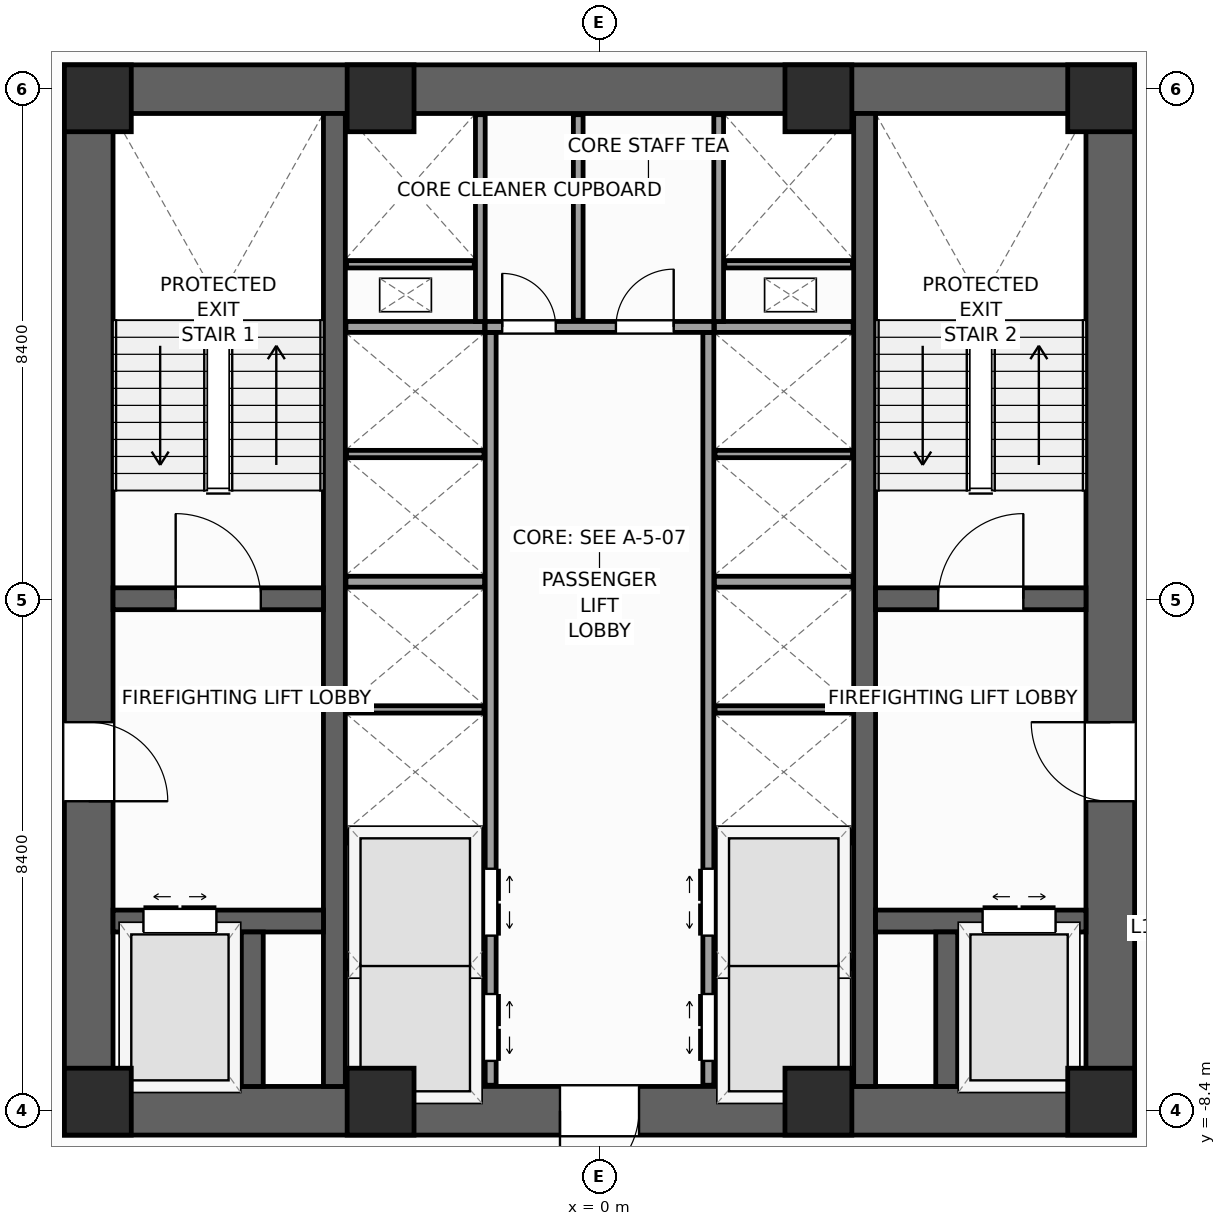
"""IFC4 building model, lengths in metres.
Left out: names, types, materials, properties, quantities, classifications, styles, units other than length and angle.
Written with IfcOpenShell. Run it as: python <this file> out.ifc"""

import sys

from ifc_helpers import new_model, si_unit, direction, frame, frame_2d, origin, origin_2d, place, context, subcontext, project, spatial, rectangle, extrude, source, transform, mapped, element, fill, save


model = new_model("IFC4")
c1 = context("Model", 3, precision=1e-05, world=origin(), true_north=direction((0.0, 1.0)))
c2 = subcontext(c1, "Body", "Model", "MODEL_VIEW")
j1 = project(units=[si_unit("LENGTHUNIT", "METRE"), si_unit("PLANEANGLEUNIT", "RADIAN")], contexts=[c1])
p1 = place(None, origin())
s1 = spatial("IfcSite", under=j1, at=p1, CompositionType="ELEMENT")
p2 = place(p1, origin())
s2 = spatial("IfcBuilding", under=s1, at=p2, CompositionType="ELEMENT")
p3 = place(p2, frame((0.0, 0.0, 50.0)))
s3 = spatial("IfcBuildingStorey", under=s2, at=p3, CompositionType="ELEMENT", Elevation=50.0)
p4 = place(p3, frame((-8.8, -8.4, 0.0), z_axis=(0.0, 0.0, 1.0), x_axis=(1.0, 0.0, 0.0)))
e1 = element("IfcWall", 1, at=p4, inside=s3, PredefinedType="SHEAR", context=c2, shape_type="SweptSolid", body=[
    extrude(rectangle(XDim=17.6, YDim=0.8, at=frame_2d((8.8, 0.0))), origin(), (0.0, 0.0, 1.0), 4.0),
])
p5 = place(p4, frame((8.15, 0.0, 0.0)))
e2 = element("IfcOpeningElement", 2, at=p5, cuts=e1, PredefinedType="OPENING", context=c2, shape_type="SweptSolid", body=[
    extrude(rectangle(XDim=1.3, YDim=2.2, at=frame_2d((0.65, 1.1))), frame((0.0, 0.41, 0.0), z_axis=(0.0, -1.0, 0.0), x_axis=(1.0, 0.0, 0.0)), (0.0, 0.0, 1.0), 0.82),
])
p6 = place(p3, frame((-8.8, 8.4, 0.0), z_axis=(0.0, 0.0, 1.0), x_axis=(1.0, 0.0, 0.0)))
e3 = element("IfcWall", 3, at=p6, inside=s3, PredefinedType="SHEAR", context=c2, shape_type="SweptSolid", body=[
    extrude(rectangle(XDim=17.6, YDim=0.8, at=frame_2d((8.8, 0.0))), origin(), (0.0, 0.0, 1.0), 4.0),
])
p7 = place(p3, frame((-8.4, -8.0, 0.0), z_axis=(0.0, 0.0, 1.0), x_axis=(0.0, 1.0, 0.0)))
e4 = element("IfcWall", 4, at=p7, inside=s3, PredefinedType="SHEAR", context=c2, shape_type="SweptSolid", body=[
    extrude(rectangle(XDim=16.0, YDim=0.8, at=frame_2d((8.0, 0.0))), origin(), (0.0, 0.0, 1.0), 4.0),
])
p8 = place(p7, frame((4.69, 0.0, 0.0)))
e5 = element("IfcOpeningElement", 5, at=p8, cuts=e4, PredefinedType="OPENING", context=c2, shape_type="SweptSolid", body=[
    extrude(rectangle(XDim=1.3, YDim=2.2, at=frame_2d((0.65, 1.1))), frame((0.0, 0.41, 0.0), z_axis=(0.0, -1.0, 0.0), x_axis=(1.0, 0.0, 0.0)), (0.0, 0.0, 1.0), 0.82),
])
p9 = place(p3, frame((8.4, -8.0, 0.0), z_axis=(0.0, 0.0, 1.0), x_axis=(0.0, 1.0, 0.0)))
e6 = element("IfcWall", 6, at=p9, inside=s3, PredefinedType="SHEAR", context=c2, shape_type="SweptSolid", body=[
    extrude(rectangle(XDim=16.0, YDim=0.8, at=frame_2d((8.0, 0.0))), origin(), (0.0, 0.0, 1.0), 4.0),
])
p10 = place(p9, frame((4.69, 0.0, 0.0)))
e7 = element("IfcOpeningElement", 7, at=p10, cuts=e6, PredefinedType="OPENING", context=c2, shape_type="SweptSolid", body=[
    extrude(rectangle(XDim=1.3, YDim=2.2, at=frame_2d((0.65, 1.1))), frame((0.0, 0.41, 0.0), z_axis=(0.0, -1.0, 0.0), x_axis=(1.0, 0.0, 0.0)), (0.0, 0.0, 1.0), 0.82),
])
for number, where, z_axis, x_axis in (
    (8, (-4.36, -8.0, 0.0), (0.0, 0.0, 1.0), (0.0, 1.0, 0.0)),
    (9, (4.36, -8.0, 0.0), (0.0, 0.0, 1.0), (0.0, 1.0, 0.0)),
):
    element("IfcWall", number, at=place(p3, frame(where, z_axis=z_axis, x_axis=x_axis)), inside=s3, PredefinedType="SHEAR", context=c2, shape_type="SweptSolid", body=[
        extrude(rectangle(XDim=16.0, YDim=0.36, at=frame_2d((8.0, 0.0))), origin(), (0.0, 0.0, 1.0), 4.0),
    ])
p11 = place(p3, frame((-8.0, 0.02, 0.0), z_axis=(0.0, 0.0, 1.0), x_axis=(1.0, 0.0, 0.0)))
e10 = element("IfcWall", 10, at=p11, inside=s3, PredefinedType="SHEAR", context=c2, shape_type="SweptSolid", body=[
    extrude(rectangle(XDim=3.46, YDim=0.36, at=frame_2d((1.73, 0.0))), origin(), (0.0, 0.0, 1.0), 4.0),
])
p12 = place(p11, frame((1.03, 0.0, 0.0)))
e11 = element("IfcOpeningElement", 11, at=p12, cuts=e10, PredefinedType="OPENING", context=c2, shape_type="SweptSolid", body=[
    extrude(rectangle(XDim=1.4, YDim=2.2, at=frame_2d((0.7, 1.1))), frame((0.0, 0.19, 0.0), z_axis=(0.0, -1.0, 0.0), x_axis=(1.0, 0.0, 0.0)), (0.0, 0.0, 1.0), 0.38),
])
p13 = place(p3, frame((4.54, 0.02, 0.0), z_axis=(0.0, 0.0, 1.0), x_axis=(1.0, 0.0, 0.0)))
e12 = element("IfcWall", 12, at=p13, inside=s3, PredefinedType="SHEAR", context=c2, shape_type="SweptSolid", body=[
    extrude(rectangle(XDim=3.46, YDim=0.36, at=frame_2d((1.73, 0.0))), origin(), (0.0, 0.0, 1.0), 4.0),
])
p14 = place(p13, frame((1.03, 0.0, 0.0)))
e13 = element("IfcOpeningElement", 13, at=p14, cuts=e12, PredefinedType="OPENING", context=c2, shape_type="SweptSolid", body=[
    extrude(rectangle(XDim=1.4, YDim=2.2, at=frame_2d((0.7, 1.1))), frame((0.0, 0.19, 0.0), z_axis=(0.0, -1.0, 0.0), x_axis=(1.0, 0.0, 0.0)), (0.0, 0.0, 1.0), 0.38),
])
p15 = place(p3, frame((-8.0, -5.28, 0.0), z_axis=(0.0, 0.0, 1.0), x_axis=(1.0, 0.0, 0.0)))
e14 = element("IfcWall", 14, at=p15, inside=s3, PredefinedType="SHEAR", context=c2, shape_type="SweptSolid", body=[
    extrude(rectangle(XDim=3.46, YDim=0.36, at=frame_2d((1.73, 0.0))), origin(), (0.0, 0.0, 1.0), 4.0),
])
p16 = place(p15, frame((0.5, 0.0, 0.0)))
e15 = element("IfcOpeningElement", 15, at=p16, cuts=e14, PredefinedType="OPENING", context=c2, shape_type="SweptSolid", body=[
    extrude(rectangle(XDim=1.2, YDim=2.25, at=frame_2d((0.6, 1.125))), frame((0.0, 0.19, 0.0), z_axis=(0.0, -1.0, 0.0), x_axis=(1.0, 0.0, 0.0)), (0.0, 0.0, 1.0), 0.38),
])
p17 = place(p3, frame((4.54, -5.28, 0.0), z_axis=(0.0, 0.0, 1.0), x_axis=(1.0, 0.0, 0.0)))
e16 = element("IfcWall", 16, at=p17, inside=s3, PredefinedType="SHEAR", context=c2, shape_type="SweptSolid", body=[
    extrude(rectangle(XDim=3.46, YDim=0.36, at=frame_2d((1.73, 0.0))), origin(), (0.0, 0.0, 1.0), 4.0),
])
p18 = place(p17, frame((1.76, 0.0, 0.0)))
e17 = element("IfcOpeningElement", 17, at=p18, cuts=e16, PredefinedType="OPENING", context=c2, shape_type="SweptSolid", body=[
    extrude(rectangle(XDim=1.2, YDim=2.25, at=frame_2d((0.6, 1.125))), frame((0.0, 0.19, 0.0), z_axis=(0.0, -1.0, 0.0), x_axis=(1.0, 0.0, 0.0)), (0.0, 0.0, 1.0), 0.38),
])
for number, where, z_axis, x_axis in (
    (18, (-5.71, -8.0, 0.0), (0.0, 0.0, 1.0), (0.0, 1.0, 0.0)),
    (19, (5.71, -8.0, 0.0), (0.0, 0.0, 1.0), (0.0, 1.0, 0.0)),
):
    element("IfcWall", number, at=place(p3, frame(where, z_axis=z_axis, x_axis=x_axis)), inside=s3, PredefinedType="SHEAR", context=c2, shape_type="SweptSolid", body=[
        extrude(rectangle(XDim=2.54, YDim=0.36, at=frame_2d((1.27, 0.0))), origin(), (0.0, 0.0, 1.0), 4.0),
    ])
m1 = source(origin(), c2, "Body", "SweptSolid", [
    extrude(rectangle(XDim=1.1, YDim=1.1, at=origin_2d()), origin(), (0.0, 0.0, 1.0), 4.0),
])
for number, where, z_axis, x_axis in (
    (20, (-8.25, -8.25, 0.0), (0.0, 0.0, 1.0), (1.0, 0.0, 0.0)),
    (21, (8.25, -8.25, 0.0), (0.0, 0.0, 1.0), (1.0, 0.0, 0.0)),
    (22, (8.25, 8.25, 0.0), (0.0, 0.0, 1.0), (1.0, 0.0, 0.0)),
    (23, (-8.25, 8.25, 0.0), (0.0, 0.0, 1.0), (1.0, 0.0, 0.0)),
    (24, (-3.6, -8.25, 0.0), (0.0, 0.0, 1.0), (1.0, 0.0, 0.0)),
    (25, (3.6, -8.25, 0.0), (0.0, 0.0, 1.0), (1.0, 0.0, 0.0)),
    (26, (-3.6, 8.25, 0.0), (0.0, 0.0, 1.0), (1.0, 0.0, 0.0)),
    (27, (3.6, 8.25, 0.0), (0.0, 0.0, 1.0), (1.0, 0.0, 0.0)),
):
    element("IfcColumn", number, at=place(p3, frame(where, z_axis=z_axis, x_axis=x_axis)), inside=s3, PredefinedType="PILASTER", context=c2, shape_type="MappedRepresentation", body=[
        mapped(m1, transform((0.0, 0.0, 0.0), scale=1.0)),
    ])
p19 = place(p3, frame((-1.79, -7.98, 0.0), z_axis=(0.0, 0.0, 1.0), x_axis=(0.0, 1.0, 0.0)))
e28 = element("IfcWall", 28, at=p19, inside=s3, PredefinedType="PARTITIONING", context=c2, shape_type="SweptSolid", body=[
    extrude(rectangle(XDim=12.38, YDim=0.18, at=frame_2d((6.19, 0.0))), origin(), (0.0, 0.0, 1.0), 3.72),
])
p20 = place(p19, frame((0.4, 0.0, 0.0)))
e29 = element("IfcOpeningElement", 29, at=p20, cuts=e28, PredefinedType="OPENING", context=c2, shape_type="SweptSolid", body=[
    extrude(rectangle(XDim=1.1, YDim=2.2, at=frame_2d((0.55, 1.1))), frame((0.0, 0.1, 0.0), z_axis=(0.0, -1.0, 0.0), x_axis=(1.0, 0.0, 0.0)), (0.0, 0.0, 1.0), 0.2),
])
p21 = place(p19, frame((2.46, 0.0, 0.0)))
e30 = element("IfcOpeningElement", 30, at=p21, cuts=e28, PredefinedType="OPENING", context=c2, shape_type="SweptSolid", body=[
    extrude(rectangle(XDim=1.1, YDim=2.2, at=frame_2d((0.55, 1.1))), frame((0.0, 0.1, 0.0), z_axis=(0.0, -1.0, 0.0), x_axis=(1.0, 0.0, 0.0)), (0.0, 0.0, 1.0), 0.2),
])
p22 = place(p3, frame((1.79, -7.98, 0.0), z_axis=(0.0, 0.0, 1.0), x_axis=(0.0, 1.0, 0.0)))
e31 = element("IfcWall", 31, at=p22, inside=s3, PredefinedType="PARTITIONING", context=c2, shape_type="SweptSolid", body=[
    extrude(rectangle(XDim=12.38, YDim=0.18, at=frame_2d((6.19, 0.0))), origin(), (0.0, 0.0, 1.0), 3.72),
])
p23 = place(p22, frame((0.4, 0.0, 0.0)))
e32 = element("IfcOpeningElement", 32, at=p23, cuts=e31, PredefinedType="OPENING", context=c2, shape_type="SweptSolid", body=[
    extrude(rectangle(XDim=1.1, YDim=2.2, at=frame_2d((0.55, 1.1))), frame((0.0, 0.1, 0.0), z_axis=(0.0, -1.0, 0.0), x_axis=(1.0, 0.0, 0.0)), (0.0, 0.0, 1.0), 0.2),
])
p24 = place(p22, frame((2.46, 0.0, 0.0)))
e33 = element("IfcOpeningElement", 33, at=p24, cuts=e31, PredefinedType="OPENING", context=c2, shape_type="SweptSolid", body=[
    extrude(rectangle(XDim=1.1, YDim=2.2, at=frame_2d((0.55, 1.1))), frame((0.0, 0.1, 0.0), z_axis=(0.0, -1.0, 0.0), x_axis=(1.0, 0.0, 0.0)), (0.0, 0.0, 1.0), 0.2),
])
p25 = place(p3, frame((-1.88, 4.49, 0.0), z_axis=(0.0, 0.0, 1.0), x_axis=(1.0, 0.0, 0.0)))
e34 = element("IfcWall", 34, at=p25, inside=s3, PredefinedType="PARTITIONING", context=c2, shape_type="SweptSolid", body=[
    extrude(rectangle(XDim=3.76, YDim=0.18, at=frame_2d((1.88, 0.0))), origin(), (0.0, 0.0, 1.0), 3.72),
])
p26 = place(p25, frame((0.28, 0.0, 0.0)))
e35 = element("IfcOpeningElement", 35, at=p26, cuts=e34, PredefinedType="OPENING", context=c2, shape_type="SweptSolid", body=[
    extrude(rectangle(XDim=0.88, YDim=2.1, at=frame_2d((0.44, 1.05))), frame((0.0, 0.1, 0.0), z_axis=(0.0, -1.0, 0.0), x_axis=(1.0, 0.0, 0.0)), (0.0, 0.0, 1.0), 0.2),
])
p27 = place(p25, frame((2.15, 0.0, 0.0)))
e36 = element("IfcOpeningElement", 36, at=p27, cuts=e34, PredefinedType="OPENING", context=c2, shape_type="SweptSolid", body=[
    extrude(rectangle(XDim=0.95, YDim=2.1, at=frame_2d((0.475, 1.05))), frame((0.0, 0.1, 0.0), z_axis=(0.0, -1.0, 0.0), x_axis=(1.0, 0.0, 0.0)), (0.0, 0.0, 1.0), 0.2),
])
for number, where, z_axis, x_axis in (
    (37, (-4.17, -3.9, 0.0), (0.0, 0.0, 1.0), (1.0, 0.0, 0.0)),
    (38, (1.89, -3.9, 0.0), (0.0, 0.0, 1.0), (1.0, 0.0, 0.0)),
    (39, (-4.17, 0.3, 0.0), (0.0, 0.0, 1.0), (1.0, 0.0, 0.0)),
    (40, (1.89, 0.3, 0.0), (0.0, 0.0, 1.0), (1.0, 0.0, 0.0)),
    (41, (-4.17, 4.49, 0.0), (0.0, 0.0, 1.0), (1.0, 0.0, 0.0)),
    (42, (1.89, 4.49, 0.0), (0.0, 0.0, 1.0), (1.0, 0.0, 0.0)),
):
    element("IfcWall", number, at=place(p3, frame(where, z_axis=z_axis, x_axis=x_axis)), inside=s3, PredefinedType="PARTITIONING", context=c2, shape_type="SweptSolid", body=[
        extrude(rectangle(XDim=2.28, YDim=0.18, at=frame_2d((1.14, 0.0))), origin(), (0.0, 0.0, 1.0), 3.72),
    ])
for number, where, z_axis, x_axis in (
    (43, (-4.16, -6.0, 0.0), (0.0, 0.0, 1.0), (1.0, 0.0, 0.0)),
    (44, (1.9, -6.0, 0.0), (0.0, 0.0, 1.0), (1.0, 0.0, 0.0)),
    (45, (-4.16, -1.8, 0.0), (0.0, 0.0, 1.0), (1.0, 0.0, 0.0)),
    (46, (1.9, -1.8, 0.0), (0.0, 0.0, 1.0), (1.0, 0.0, 0.0)),
    (47, (-4.16, 2.4, 0.0), (0.0, 0.0, 1.0), (1.0, 0.0, 0.0)),
    (48, (1.9, 2.4, 0.0), (0.0, 0.0, 1.0), (1.0, 0.0, 0.0)),
):
    element("IfcWall", number, at=place(p3, frame(where, z_axis=z_axis, x_axis=x_axis)), inside=s3, PredefinedType="PARTITIONING", context=c2, shape_type="SweptSolid", body=[
        extrude(rectangle(XDim=2.26, YDim=0.12, at=frame_2d((1.13, 0.0))), origin(), (0.0, 0.0, 1.0), 3.72),
    ])
for number, where, z_axis, x_axis in (
    (49, (-1.96, 4.58, 0.0), (0.0, 0.0, 1.0), (0.0, 1.0, 0.0)),
    (50, (1.96, 4.58, 0.0), (0.0, 0.0, 1.0), (0.0, 1.0, 0.0)),
):
    element("IfcWall", number, at=place(p3, frame(where, z_axis=z_axis, x_axis=x_axis)), inside=s3, PredefinedType="PARTITIONING", context=c2, shape_type="SweptSolid", body=[
        extrude(rectangle(XDim=3.4, YDim=0.16, at=frame_2d((1.7, 0.0))), origin(), (0.0, 0.0, 1.0), 3.72),
    ])
for number, where, z_axis, x_axis in (
    (51, (-4.16, 5.52, 0.0), (0.0, 0.0, 1.0), (1.0, 0.0, 0.0)),
    (52, (2.06, 5.52, 0.0), (0.0, 0.0, 1.0), (1.0, 0.0, 0.0)),
):
    element("IfcWall", number, at=place(p3, frame(where, z_axis=z_axis, x_axis=x_axis)), inside=s3, PredefinedType="PARTITIONING", context=c2, shape_type="SweptSolid", body=[
        extrude(rectangle(XDim=2.1, YDim=0.12, at=frame_2d((1.05, 0.0))), origin(), (0.0, 0.0, 1.0), 3.72),
    ])
p28 = place(p3, frame((-0.35, 4.6, 0.0), z_axis=(0.0, 0.0, 1.0), x_axis=(0.0, 1.0, 0.0)))
e53 = element("IfcWall", 53, at=p28, inside=s3, PredefinedType="PARTITIONING", context=c2, shape_type="SweptSolid", body=[
    extrude(rectangle(XDim=3.38, YDim=0.16, at=frame_2d((1.69, 0.0))), origin(), (0.0, 0.0, 1.0), 3.72),
])
m2 = source(origin(), c2, "Body", "SweptSolid", [
    extrude(rectangle(XDim=1.4, YDim=2.2, at=frame_2d((0.7, 1.1))), frame((0.0, 0.025, 0.0), z_axis=(0.0, -1.0, 0.0), x_axis=(1.0, 0.0, 0.0)), (0.0, 0.0, 1.0), 0.05),
])
p29 = place(p12, origin())
e54 = element("IfcDoor", 54, at=p29, inside=s3, OperationType="SINGLE_SWING_LEFT", PredefinedType="DOOR", context=c2, shape_type="MappedRepresentation", body=[
    mapped(m2, transform((0.0, 0.0, 0.0), scale=1.0)),
])
fill(e11, e54)
p30 = place(p14, origin())
e55 = element("IfcDoor", 55, at=p30, inside=s3, OperationType="SINGLE_SWING_RIGHT", PredefinedType="DOOR", context=c2, shape_type="MappedRepresentation", body=[
    mapped(m2, transform((0.0, 0.0, 0.0), scale=1.0)),
])
fill(e13, e55)
m3 = source(origin(), c2, "Body", "SweptSolid", [
    extrude(rectangle(XDim=1.3, YDim=2.2, at=frame_2d((0.65, 1.1))), frame((0.0, 0.025, 0.0), z_axis=(0.0, -1.0, 0.0), x_axis=(1.0, 0.0, 0.0)), (0.0, 0.0, 1.0), 0.05),
])
p31 = place(p8, frame((1.3, 0.0, 0.0), z_axis=(0.0, 0.0, 1.0), x_axis=(-1.0, 0.0, 0.0)))
e56 = element("IfcDoor", 56, at=p31, inside=s3, OperationType="SINGLE_SWING_LEFT", PredefinedType="DOOR", context=c2, shape_type="MappedRepresentation", body=[
    mapped(m3, transform((0.0, 0.0, 0.0), scale=1.0)),
])
fill(e5, e56)
p32 = place(p10, origin())
e57 = element("IfcDoor", 57, at=p32, inside=s3, OperationType="SINGLE_SWING_RIGHT", PredefinedType="DOOR", context=c2, shape_type="MappedRepresentation", body=[
    mapped(m3, transform((0.0, 0.0, 0.0), scale=1.0)),
])
fill(e7, e57)
p33 = place(p5, frame((1.3, 0.0, 0.0), z_axis=(0.0, 0.0, 1.0), x_axis=(-1.0, 0.0, 0.0)))
e58 = element("IfcDoor", 58, at=p33, inside=s3, OperationType="SINGLE_SWING_LEFT", PredefinedType="DOOR", context=c2, shape_type="MappedRepresentation", body=[
    mapped(m3, transform((0.0, 0.0, 0.0), scale=1.0)),
])
fill(e2, e58)
m4 = source(origin(), c2, "Body", "SweptSolid", [
    extrude(rectangle(XDim=1.2, YDim=2.25, at=frame_2d((0.6, 1.125))), frame((0.0, 0.025, 0.0), z_axis=(0.0, -1.0, 0.0), x_axis=(1.0, 0.0, 0.0)), (0.0, 0.0, 1.0), 0.05),
])
p34 = place(p16, origin())
e59 = element("IfcDoor", 59, at=p34, inside=s3, OperationType="DOUBLE_DOOR_SLIDING", PredefinedType="DOOR", context=c2, shape_type="MappedRepresentation", body=[
    mapped(m4, transform((0.0, 0.0, 0.0), scale=1.0)),
])
fill(e15, e59)
p35 = place(p18, origin())
e60 = element("IfcDoor", 60, at=p35, inside=s3, OperationType="DOUBLE_DOOR_SLIDING", PredefinedType="DOOR", context=c2, shape_type="MappedRepresentation", body=[
    mapped(m4, transform((0.0, 0.0, 0.0), scale=1.0)),
])
fill(e17, e60)
m5 = source(origin(), c2, "Body", "SweptSolid", [
    extrude(rectangle(XDim=1.1, YDim=2.2, at=frame_2d((0.55, 1.1))), frame((0.0, 0.025, 0.0), z_axis=(0.0, -1.0, 0.0), x_axis=(1.0, 0.0, 0.0)), (0.0, 0.0, 1.0), 0.05),
])
p36 = place(p20, frame((1.1, 0.0, 0.0), z_axis=(0.0, 0.0, 1.0), x_axis=(-1.0, 0.0, 0.0)))
e61 = element("IfcDoor", 61, at=p36, inside=s3, OperationType="DOUBLE_DOOR_SLIDING", PredefinedType="DOOR", context=c2, shape_type="MappedRepresentation", body=[
    mapped(m5, transform((0.0, 0.0, 0.0), scale=1.0)),
])
fill(e29, e61)
p37 = place(p21, frame((1.1, 0.0, 0.0), z_axis=(0.0, 0.0, 1.0), x_axis=(-1.0, 0.0, 0.0)))
e62 = element("IfcDoor", 62, at=p37, inside=s3, OperationType="DOUBLE_DOOR_SLIDING", PredefinedType="DOOR", context=c2, shape_type="MappedRepresentation", body=[
    mapped(m5, transform((0.0, 0.0, 0.0), scale=1.0)),
])
fill(e30, e62)
p38 = place(p23, origin())
e63 = element("IfcDoor", 63, at=p38, inside=s3, OperationType="DOUBLE_DOOR_SLIDING", PredefinedType="DOOR", context=c2, shape_type="MappedRepresentation", body=[
    mapped(m5, transform((0.0, 0.0, 0.0), scale=1.0)),
])
fill(e32, e63)
p39 = place(p24, origin())
e64 = element("IfcDoor", 64, at=p39, inside=s3, OperationType="DOUBLE_DOOR_SLIDING", PredefinedType="DOOR", context=c2, shape_type="MappedRepresentation", body=[
    mapped(m5, transform((0.0, 0.0, 0.0), scale=1.0)),
])
fill(e33, e64)
m6 = source(origin(), c2, "Body", "SweptSolid", [
    extrude(rectangle(XDim=0.88, YDim=2.1, at=frame_2d((0.44, 1.05))), frame((0.0, 0.025, 0.0), z_axis=(0.0, -1.0, 0.0), x_axis=(1.0, 0.0, 0.0)), (0.0, 0.0, 1.0), 0.05),
])
p40 = place(p26, origin())
e65 = element("IfcDoor", 65, at=p40, inside=s3, OperationType="SINGLE_SWING_LEFT", PredefinedType="DOOR", context=c2, shape_type="MappedRepresentation", body=[
    mapped(m6, transform((0.0, 0.0, 0.0), scale=1.0)),
])
fill(e35, e65)
m7 = source(origin(), c2, "Body", "SweptSolid", [
    extrude(rectangle(XDim=0.95, YDim=2.1, at=frame_2d((0.475, 1.05))), frame((0.0, 0.025, 0.0), z_axis=(0.0, -1.0, 0.0), x_axis=(1.0, 0.0, 0.0)), (0.0, 0.0, 1.0), 0.05),
])
p41 = place(p27, origin())
e66 = element("IfcDoor", 66, at=p41, inside=s3, OperationType="SINGLE_SWING_RIGHT", PredefinedType="DOOR", context=c2, shape_type="MappedRepresentation", body=[
    mapped(m7, transform((0.0, 0.0, 0.0), scale=1.0)),
])
fill(e36, e66)
save(model, sys.argv[1])
